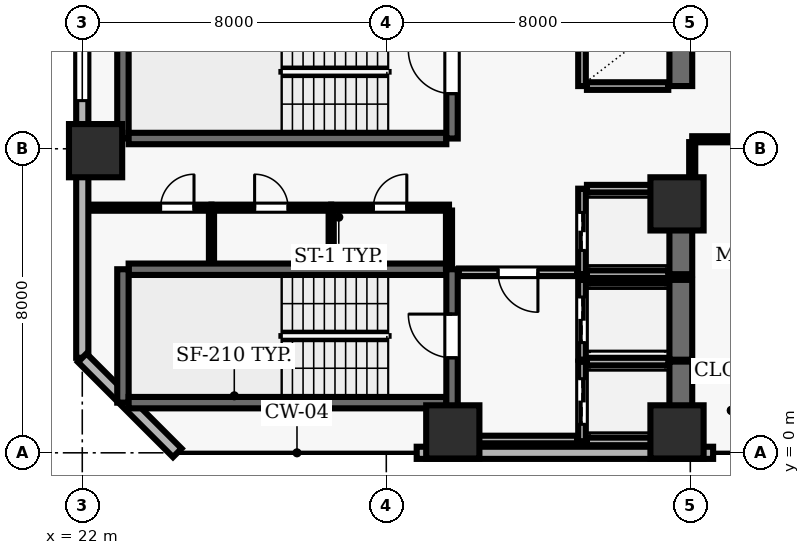
"""IFC4 building model, lengths in metres.
Left out: names, types, materials, properties, quantities, classifications, styles, units other than length and angle.
Written with IfcOpenShell. Run it as: python <this file> out.ifc"""

import sys

from ifc_helpers import new_model, si_unit, direction, frame, frame_2d, origin, origin_2d, place, context, subcontext, project, spatial, rectangle, extrude, element, fill, save


model = new_model("IFC4")
c1 = context("Model", 3, precision=1e-05, world=origin(), true_north=direction((0.0, 1.0)))
c2 = subcontext(c1, "Body", "Model", "MODEL_VIEW")
j1 = project(units=[si_unit("LENGTHUNIT", "METRE"), si_unit("PLANEANGLEUNIT", "RADIAN")], contexts=[c1])
p1 = place(None, origin())
s1 = spatial("IfcSite", under=j1, at=p1, CompositionType="ELEMENT")
p2 = place(p1, origin())
s2 = spatial("IfcBuilding", under=s1, at=p2, CompositionType="ELEMENT")
p3 = place(p2, frame((0.0, 0.0, 38.8)))
s3 = spatial("IfcBuildingStorey", under=s2, at=p3, CompositionType="ELEMENT", Elevation=38.8)
for number, where, z_axis, x_axis in (
    (1, (31.75, 0.55, 0.0), (0.0, 0.0, 1.0), (1.0, 0.0, 0.0)),
    (2, (37.65, 0.55, 0.0), (0.0, 0.0, 1.0), (1.0, 0.0, 0.0)),
    (3, (22.35, 7.95, 0.0), (0.0, 0.0, 1.0), (1.0, 0.0, 0.0)),
    (4, (37.65, 6.55, 0.0), (0.0, 0.0, 1.0), (1.0, 0.0, 0.0)),
):
    element("IfcColumn", number, at=place(p3, frame(where, z_axis=z_axis, x_axis=x_axis)), inside=s3, PredefinedType="COLUMN", context=c2, shape_type="SweptSolid", body=[
        extrude(rectangle(XDim=1.4, YDim=1.4, at=origin_2d()), origin(), (0.0, 0.0, 1.0), 3.9),
    ])
p4 = place(p3, frame((30.8, 0.0, 0.0), z_axis=(0.0, 0.0, 1.0), x_axis=(1.0, 0.0, 0.0)))
e5 = element("IfcWall", 5, at=p4, inside=s3, PredefinedType="SOLIDWALL", context=c2, shape_type="SweptSolid", body=[
    extrude(rectangle(XDim=7.8, YDim=0.32, at=frame_2d((3.9, 0.0))), origin(), (0.0, 0.0, 1.0), 3.69),
])
p5 = place(p3, frame((22.0, 51.5, 0.0), z_axis=(0.0, 0.0, 1.0), x_axis=(0.0, -1.0, 0.0)))
e6 = element("IfcWall", 6, at=p5, inside=s3, PredefinedType="SOLIDWALL", context=c2, shape_type="SweptSolid", body=[
    extrude(rectangle(XDim=49.0, YDim=0.32, at=frame_2d((24.5, 0.0))), origin(), (0.0, 0.0, 1.0), 3.69),
])
p6 = place(p5, frame((12.1, 0.0, 0.0)))
e7 = element("IfcOpeningElement", 7, at=p6, cuts=e6, PredefinedType="OPENING", context=c2, shape_type="SweptSolid", body=[
    extrude(rectangle(XDim=1.0, YDim=2.2, at=frame_2d((0.5, 1.1))), frame((0.0, 0.17, 0.0), z_axis=(0.0, -1.0, 0.0), x_axis=(1.0, 0.0, 0.0)), (0.0, 0.0, 1.0), 0.34),
])
p7 = place(p5, frame((1.322, 0.0, 0.9)))
e8 = element("IfcOpeningElement", 8, at=p7, cuts=e6, PredefinedType="OPENING", context=c2, shape_type="SweptSolid", body=[
    extrude(rectangle(XDim=2.8, YDim=1.8, at=frame_2d((1.4, 0.9))), frame((0.0, 0.17, 0.0), z_axis=(0.0, -1.0, 0.0), x_axis=(1.0, 0.0, 0.0)), (0.0, 0.0, 1.0), 0.34),
])
p8 = place(p5, frame((17.656, 0.0, 0.9)))
e9 = element("IfcOpeningElement", 9, at=p8, cuts=e6, PredefinedType="OPENING", context=c2, shape_type="SweptSolid", body=[
    extrude(rectangle(XDim=2.8, YDim=1.8, at=frame_2d((1.4, 0.9))), frame((0.0, 0.17, 0.0), z_axis=(0.0, -1.0, 0.0), x_axis=(1.0, 0.0, 0.0)), (0.0, 0.0, 1.0), 0.34),
])
p9 = place(p5, frame((28.994, 0.0, 0.9)))
e10 = element("IfcOpeningElement", 10, at=p9, cuts=e6, PredefinedType="OPENING", context=c2, shape_type="SweptSolid", body=[
    extrude(rectangle(XDim=2.8, YDim=1.8, at=frame_2d((1.4, 0.9))), frame((0.0, 0.17, 0.0), z_axis=(0.0, -1.0, 0.0), x_axis=(1.0, 0.0, 0.0)), (0.0, 0.0, 1.0), 0.34),
])
p10 = place(p5, frame((33.089, 0.0, 0.9)))
e11 = element("IfcOpeningElement", 11, at=p10, cuts=e6, PredefinedType="OPENING", context=c2, shape_type="SweptSolid", body=[
    extrude(rectangle(XDim=2.8, YDim=1.8, at=frame_2d((1.4, 0.9))), frame((0.0, 0.17, 0.0), z_axis=(0.0, -1.0, 0.0), x_axis=(1.0, 0.0, 0.0)), (0.0, 0.0, 1.0), 0.34),
])
p11 = place(p5, frame((39.433, 0.0, 0.9)))
e12 = element("IfcOpeningElement", 12, at=p11, cuts=e6, PredefinedType="OPENING", context=c2, shape_type="SweptSolid", body=[
    extrude(rectangle(XDim=2.8, YDim=1.8, at=frame_2d((1.4, 0.9))), frame((0.0, 0.17, 0.0), z_axis=(0.0, -1.0, 0.0), x_axis=(1.0, 0.0, 0.0)), (0.0, 0.0, 1.0), 0.34),
])
p12 = place(p3, frame((22.0, 2.5, 0.0), z_axis=(0.0, 0.0, 1.0), x_axis=(0.707106781187, -0.707106781187, 0.0)))
e13 = element("IfcWall", 13, at=p12, inside=s3, PredefinedType="SOLIDWALL", context=c2, shape_type="SweptSolid", body=[
    extrude(rectangle(XDim=3.536, YDim=0.32, at=frame_2d((1.768, 0.0))), origin(), (0.0, 0.0, 1.0), 3.69),
])
p13 = place(p3, frame((31.58, 4.83, 0.0), z_axis=(0.0, 0.0, 1.0), x_axis=(-1.0, 0.0, 0.0)))
e14 = element("IfcWall", 14, at=p13, inside=s3, PredefinedType="SHEAR", context=c2, shape_type="SweptSolid", body=[
    extrude(rectangle(XDim=8.36, YDim=0.3, at=frame_2d((4.18, 0.0))), origin(), (0.0, 0.0, 1.0), 3.69),
])
p14 = place(p3, frame((23.07, 4.83, 0.0), z_axis=(0.0, 0.0, 1.0), x_axis=(0.0, -1.0, 0.0)))
e15 = element("IfcWall", 15, at=p14, inside=s3, PredefinedType="SHEAR", context=c2, shape_type="SweptSolid", body=[
    extrude(rectangle(XDim=3.51, YDim=0.3, at=frame_2d((1.755, 0.0))), origin(), (0.0, 0.0, 1.0), 3.69),
])
p15 = place(p3, frame((23.22, 1.32, 0.0), z_axis=(0.0, 0.0, 1.0), x_axis=(1.0, 0.0, 0.0)))
e16 = element("IfcWall", 16, at=p15, inside=s3, PredefinedType="SHEAR", context=c2, shape_type="SweptSolid", body=[
    extrude(rectangle(XDim=8.36, YDim=0.3, at=frame_2d((4.18, 0.0))), origin(), (0.0, 0.0, 1.0), 3.69),
])
p16 = place(p3, frame((31.73, 0.96, 0.0), z_axis=(0.0, 0.0, 1.0), x_axis=(0.0, 1.0, 0.0)))
e17 = element("IfcWall", 17, at=p16, inside=s3, PredefinedType="SHEAR", context=c2, shape_type="SweptSolid", body=[
    extrude(rectangle(XDim=3.87, YDim=0.3, at=frame_2d((1.935, 0.0))), origin(), (0.0, 0.0, 1.0), 3.69),
])
p17 = place(p16, frame((1.54, 0.0, 0.0)))
e18 = element("IfcOpeningElement", 18, at=p17, cuts=e17, PredefinedType="OPENING", context=c2, shape_type="SweptSolid", body=[
    extrude(rectangle(XDim=1.15, YDim=2.15, at=frame_2d((0.575, 1.075))), frame((0.0, 0.16, 0.0), z_axis=(0.0, -1.0, 0.0), x_axis=(1.0, 0.0, 0.0)), (0.0, 0.0, 1.0), 0.32),
])
p18 = place(p3, frame((23.07, 11.78, 0.0), z_axis=(0.0, 0.0, 1.0), x_axis=(0.0, -1.0, 0.0)))
e19 = element("IfcWall", 19, at=p18, inside=s3, PredefinedType="SHEAR", context=c2, shape_type="SweptSolid", body=[
    extrude(rectangle(XDim=3.51, YDim=0.3, at=frame_2d((1.755, 0.0))), origin(), (0.0, 0.0, 1.0), 3.69),
])
p19 = place(p3, frame((23.22, 8.27, 0.0), z_axis=(0.0, 0.0, 1.0), x_axis=(1.0, 0.0, 0.0)))
e20 = element("IfcWall", 20, at=p19, inside=s3, PredefinedType="SHEAR", context=c2, shape_type="SweptSolid", body=[
    extrude(rectangle(XDim=8.36, YDim=0.3, at=frame_2d((4.18, 0.0))), origin(), (0.0, 0.0, 1.0), 3.69),
])
p20 = place(p3, frame((31.73, 8.27, 0.0), z_axis=(0.0, 0.0, 1.0), x_axis=(0.0, 1.0, 0.0)))
e21 = element("IfcWall", 21, at=p20, inside=s3, PredefinedType="SHEAR", context=c2, shape_type="SweptSolid", body=[
    extrude(rectangle(XDim=3.51, YDim=0.3, at=frame_2d((1.755, 0.0))), origin(), (0.0, 0.0, 1.0), 3.69),
])
p21 = place(p20, frame((1.18, 0.0, 0.0)))
e22 = element("IfcOpeningElement", 22, at=p21, cuts=e21, PredefinedType="OPENING", context=c2, shape_type="SweptSolid", body=[
    extrude(rectangle(XDim=1.15, YDim=2.15, at=frame_2d((0.575, 1.075))), frame((0.0, 0.16, 0.0), z_axis=(0.0, -1.0, 0.0), x_axis=(1.0, 0.0, 0.0)), (0.0, 0.0, 1.0), 0.32),
])
p22 = place(p3, frame((35.15, 2.4, 0.0), z_axis=(0.0, 0.0, 1.0), x_axis=(0.0, -1.0, 0.0)))
e23 = element("IfcWall", 23, at=p22, inside=s3, PredefinedType="SOLIDWALL", context=c2, shape_type="SweptSolid", body=[
    extrude(rectangle(XDim=2.1, YDim=0.2, at=frame_2d((1.05, 0.0))), origin(), (0.0, 0.0, 1.0), 3.69),
])
p23 = place(p22, frame((0.45, 0.0, 0.0)))
e24 = element("IfcOpeningElement", 24, at=p23, cuts=e23, PredefinedType="OPENING", context=c2, shape_type="SweptSolid", body=[
    extrude(rectangle(XDim=1.2, YDim=2.15, at=frame_2d((0.6, 1.075))), frame((0.0, 0.11, 0.0), z_axis=(0.0, -1.0, 0.0), x_axis=(1.0, 0.0, 0.0)), (0.0, 0.0, 1.0), 0.22),
])
p24 = place(p3, frame((37.75, 0.3, 0.0), z_axis=(0.0, 0.0, 1.0), x_axis=(0.0, 1.0, 0.0)))
e25 = element("IfcWall", 25, at=p24, inside=s3, PredefinedType="SHEAR", context=c2, shape_type="SweptSolid", body=[
    extrude(rectangle(XDim=2.1, YDim=0.6, at=frame_2d((1.05, 0.0))), origin(), (0.0, 0.0, 1.0), 3.69),
])
for number, where, z_axis, x_axis in (
    (26, (35.28, 0.3, 0.0), (0.0, 0.0, 1.0), (1.0, 0.0, 0.0)),
    (27, (37.42, 2.4, 0.0), (0.0, 0.0, 1.0), (-1.0, 0.0, 0.0)),
):
    element("IfcWall", number, at=place(p3, frame(where, z_axis=z_axis, x_axis=x_axis)), inside=s3, PredefinedType="SOLIDWALL", context=c2, shape_type="SweptSolid", body=[
        extrude(rectangle(XDim=2.14, YDim=0.2, at=frame_2d((1.07, 0.0))), origin(), (0.0, 0.0, 1.0), 3.69),
    ])
p25 = place(p3, frame((35.15, 4.55, 0.0), z_axis=(0.0, 0.0, 1.0), x_axis=(0.0, -1.0, 0.0)))
e28 = element("IfcWall", 28, at=p25, inside=s3, PredefinedType="SOLIDWALL", context=c2, shape_type="SweptSolid", body=[
    extrude(rectangle(XDim=2.1, YDim=0.2, at=frame_2d((1.05, 0.0))), origin(), (0.0, 0.0, 1.0), 3.69),
])
p26 = place(p25, frame((0.45, 0.0, 0.0)))
e29 = element("IfcOpeningElement", 29, at=p26, cuts=e28, PredefinedType="OPENING", context=c2, shape_type="SweptSolid", body=[
    extrude(rectangle(XDim=1.2, YDim=2.15, at=frame_2d((0.6, 1.075))), frame((0.0, 0.11, 0.0), z_axis=(0.0, -1.0, 0.0), x_axis=(1.0, 0.0, 0.0)), (0.0, 0.0, 1.0), 0.22),
])
p27 = place(p3, frame((37.75, 2.45, 0.0), z_axis=(0.0, 0.0, 1.0), x_axis=(0.0, 1.0, 0.0)))
e30 = element("IfcWall", 30, at=p27, inside=s3, PredefinedType="SHEAR", context=c2, shape_type="SweptSolid", body=[
    extrude(rectangle(XDim=2.1, YDim=0.6, at=frame_2d((1.05, 0.0))), origin(), (0.0, 0.0, 1.0), 3.69),
])
p28 = place(p3, frame((37.42, 4.55, 0.0), z_axis=(0.0, 0.0, 1.0), x_axis=(-1.0, 0.0, 0.0)))
e31 = element("IfcWall", 31, at=p28, inside=s3, PredefinedType="SOLIDWALL", context=c2, shape_type="SweptSolid", body=[
    extrude(rectangle(XDim=2.14, YDim=0.2, at=frame_2d((1.07, 0.0))), origin(), (0.0, 0.0, 1.0), 3.69),
])
p29 = place(p3, frame((35.15, 6.95, 0.0), z_axis=(0.0, 0.0, 1.0), x_axis=(0.0, -1.0, 0.0)))
e32 = element("IfcWall", 32, at=p29, inside=s3, PredefinedType="SOLIDWALL", context=c2, shape_type="SweptSolid", body=[
    extrude(rectangle(XDim=2.25, YDim=0.2, at=frame_2d((1.125, 0.0))), origin(), (0.0, 0.0, 1.0), 3.69),
])
p30 = place(p29, frame((0.625, 0.0, 0.0)))
e33 = element("IfcOpeningElement", 33, at=p30, cuts=e32, PredefinedType="OPENING", context=c2, shape_type="SweptSolid", body=[
    extrude(rectangle(XDim=1.0, YDim=2.1, at=frame_2d((0.5, 1.05))), frame((0.0, 0.11, 0.0), z_axis=(0.0, -1.0, 0.0), x_axis=(1.0, 0.0, 0.0)), (0.0, 0.0, 1.0), 0.22),
])
p31 = place(p3, frame((37.75, 4.7, 0.0), z_axis=(0.0, 0.0, 1.0), x_axis=(0.0, 1.0, 0.0)))
e34 = element("IfcWall", 34, at=p31, inside=s3, PredefinedType="SHEAR", context=c2, shape_type="SweptSolid", body=[
    extrude(rectangle(XDim=2.25, YDim=0.6, at=frame_2d((1.125, 0.0))), origin(), (0.0, 0.0, 1.0), 3.69),
])
for number, where, z_axis, x_axis in (
    (35, (35.28, 4.7, 0.0), (0.0, 0.0, 1.0), (1.0, 0.0, 0.0)),
    (36, (37.42, 6.95, 0.0), (0.0, 0.0, 1.0), (-1.0, 0.0, 0.0)),
):
    element("IfcWall", number, at=place(p3, frame(where, z_axis=z_axis, x_axis=x_axis)), inside=s3, PredefinedType="SOLIDWALL", context=c2, shape_type="SweptSolid", body=[
        extrude(rectangle(XDim=2.14, YDim=0.2, at=frame_2d((1.07, 0.0))), origin(), (0.0, 0.0, 1.0), 3.69),
    ])
p32 = place(p3, frame((35.15, 11.55, 0.0), z_axis=(0.0, 0.0, 1.0), x_axis=(0.0, -1.0, 0.0)))
e37 = element("IfcWall", 37, at=p32, inside=s3, PredefinedType="SOLIDWALL", context=c2, shape_type="SweptSolid", body=[
    extrude(rectangle(XDim=1.9, YDim=0.2, at=frame_2d((0.95, 0.0))), origin(), (0.0, 0.0, 1.0), 3.69),
])
p33 = place(p3, frame((37.75, 9.65, 0.0), z_axis=(0.0, 0.0, 1.0), x_axis=(0.0, 1.0, 0.0)))
e38 = element("IfcWall", 38, at=p33, inside=s3, PredefinedType="SHEAR", context=c2, shape_type="SweptSolid", body=[
    extrude(rectangle(XDim=1.9, YDim=0.6, at=frame_2d((0.95, 0.0))), origin(), (0.0, 0.0, 1.0), 3.69),
])
p34 = place(p3, frame((35.28, 9.65, 0.0), z_axis=(0.0, 0.0, 1.0), x_axis=(1.0, 0.0, 0.0)))
e39 = element("IfcWall", 39, at=p34, inside=s3, PredefinedType="SOLIDWALL", context=c2, shape_type="SweptSolid", body=[
    extrude(rectangle(XDim=2.14, YDim=0.2, at=frame_2d((1.07, 0.0))), origin(), (0.0, 0.0, 1.0), 3.69),
])
p35 = place(p3, frame((22.2, 6.45, 0.0), z_axis=(0.0, 0.0, 1.0), x_axis=(1.0, 0.0, 0.0)))
e40 = element("IfcWall", 40, at=p35, inside=s3, PredefinedType="PARTITIONING", context=c2, shape_type="SweptSolid", body=[
    extrude(rectangle(XDim=3.2, YDim=0.16, at=frame_2d((1.6, 0.0))), origin(), (0.0, 0.0, 1.0), 3.69),
])
p36 = place(p35, frame((1.86, 0.0, 0.0)))
e41 = element("IfcOpeningElement", 41, at=p36, cuts=e40, PredefinedType="OPENING", context=c2, shape_type="SweptSolid", body=[
    extrude(rectangle(XDim=0.88, YDim=2.1, at=frame_2d((0.44, 1.05))), frame((0.0, 0.09, 0.0), z_axis=(0.0, -1.0, 0.0), x_axis=(1.0, 0.0, 0.0)), (0.0, 0.0, 1.0), 0.18),
])
p37 = place(p3, frame((25.4, 6.45, 0.0), z_axis=(0.0, 0.0, 1.0), x_axis=(1.0, 0.0, 0.0)))
e42 = element("IfcWall", 42, at=p37, inside=s3, PredefinedType="PARTITIONING", context=c2, shape_type="SweptSolid", body=[
    extrude(rectangle(XDim=3.15, YDim=0.16, at=frame_2d((1.575, 0.0))), origin(), (0.0, 0.0, 1.0), 3.69),
])
p38 = place(p37, frame((1.135, 0.0, 0.0)))
e43 = element("IfcOpeningElement", 43, at=p38, cuts=e42, PredefinedType="OPENING", context=c2, shape_type="SweptSolid", body=[
    extrude(rectangle(XDim=0.88, YDim=2.1, at=frame_2d((0.44, 1.05))), frame((0.0, 0.09, 0.0), z_axis=(0.0, -1.0, 0.0), x_axis=(1.0, 0.0, 0.0)), (0.0, 0.0, 1.0), 0.18),
])
p39 = place(p3, frame((28.55, 6.45, 0.0), z_axis=(0.0, 0.0, 1.0), x_axis=(1.0, 0.0, 0.0)))
e44 = element("IfcWall", 44, at=p39, inside=s3, PredefinedType="PARTITIONING", context=c2, shape_type="SweptSolid", body=[
    extrude(rectangle(XDim=3.1, YDim=0.16, at=frame_2d((1.55, 0.0))), origin(), (0.0, 0.0, 1.0), 3.69),
])
p40 = place(p39, frame((1.11, 0.0, 0.0)))
e45 = element("IfcOpeningElement", 45, at=p40, cuts=e44, PredefinedType="OPENING", context=c2, shape_type="SweptSolid", body=[
    extrude(rectangle(XDim=0.88, YDim=2.1, at=frame_2d((0.44, 1.05))), frame((0.0, 0.09, 0.0), z_axis=(0.0, -1.0, 0.0), x_axis=(1.0, 0.0, 0.0)), (0.0, 0.0, 1.0), 0.18),
])
p41 = place(p3, frame((31.65, 0.35, 0.0), z_axis=(0.0, 0.0, 1.0), x_axis=(1.0, 0.0, 0.0)))
e46 = element("IfcWall", 46, at=p41, inside=s3, PredefinedType="SOLIDWALL", context=c2, shape_type="SweptSolid", body=[
    extrude(rectangle(XDim=3.37, YDim=0.2, at=frame_2d((1.685, 0.0))), origin(), (0.0, 0.0, 1.0), 3.69),
])
p42 = place(p3, frame((35.02, 4.75, 0.0), z_axis=(0.0, 0.0, 1.0), x_axis=(-1.0, 0.0, 0.0)))
e47 = element("IfcWall", 47, at=p42, inside=s3, PredefinedType="SOLIDWALL", context=c2, shape_type="SweptSolid", body=[
    extrude(rectangle(XDim=3.11, YDim=0.2, at=frame_2d((1.555, 0.0))), origin(), (0.0, 0.0, 1.0), 3.69),
])
p43 = place(p42, frame((1.03, 0.0, 0.0)))
e48 = element("IfcOpeningElement", 48, at=p43, cuts=e47, PredefinedType="OPENING", context=c2, shape_type="SweptSolid", body=[
    extrude(rectangle(XDim=1.05, YDim=2.15, at=frame_2d((0.525, 1.075))), frame((0.0, 0.11, 0.0), z_axis=(0.0, -1.0, 0.0), x_axis=(1.0, 0.0, 0.0)), (0.0, 0.0, 1.0), 0.22),
])
p44 = place(p3, frame((38.05, 8.25, 0.0), z_axis=(0.0, 0.0, 1.0), x_axis=(1.0, 0.0, 0.0)))
e49 = element("IfcWall", 49, at=p44, inside=s3, PredefinedType="PARTITIONING", context=c2, shape_type="SweptSolid", body=[
    extrude(rectangle(XDim=2.3, YDim=0.16, at=frame_2d((1.15, 0.0))), origin(), (0.0, 0.0, 1.0), 2.995),
])
p45 = place(p44, frame((1.0, 0.0, 0.0)))
e50 = element("IfcOpeningElement", 50, at=p45, cuts=e49, PredefinedType="OPENING", context=c2, shape_type="SweptSolid", body=[
    extrude(rectangle(XDim=1.0, YDim=2.1, at=frame_2d((0.5, 1.05))), frame((0.0, 0.09, 0.0), z_axis=(0.0, -1.0, 0.0), x_axis=(1.0, 0.0, 0.0)), (0.0, 0.0, 1.0), 0.18),
])
for number, where, z_axis, x_axis in (
    (51, (25.4, 5.01, 0.0), (0.0, 0.0, 1.0), (0.0, 1.0, 0.0)),
    (52, (28.55, 5.01, 0.0), (0.0, 0.0, 1.0), (0.0, 1.0, 0.0)),
):
    element("IfcWall", number, at=place(p3, frame(where, z_axis=z_axis, x_axis=x_axis)), inside=s3, PredefinedType="PARTITIONING", context=c2, shape_type="SweptSolid", body=[
        extrude(rectangle(XDim=1.365, YDim=0.135, at=frame_2d((0.683, 0.0))), origin(), (0.0, 0.0, 1.0), 3.69),
    ])
p46 = place(p3, frame((31.65, 4.86, 0.0), z_axis=(0.0, 0.0, 1.0), x_axis=(0.0, 1.0, 0.0)))
e53 = element("IfcWall", 53, at=p46, inside=s3, PredefinedType="PARTITIONING", context=c2, shape_type="SweptSolid", body=[
    extrude(rectangle(XDim=1.515, YDim=0.16, at=frame_2d((0.757, 0.0))), origin(), (0.0, 0.0, 1.0), 3.69),
])
p47 = place(p3, frame((38.05, 7.05, 0.0), z_axis=(0.0, 0.0, 1.0), x_axis=(0.0, 1.0, 0.0)))
e54 = element("IfcWall", 54, at=p47, inside=s3, PredefinedType="PARTITIONING", context=c2, shape_type="SweptSolid", body=[
    extrude(rectangle(XDim=1.125, YDim=0.16, at=frame_2d((0.562, 0.0))), origin(), (0.0, 0.0, 1.0), 2.995),
])
p48 = place(p11, origin())
e55 = element("IfcWindow", 55, at=p48, inside=s3, PartitioningType="SINGLE_PANEL", PredefinedType="WINDOW", context=c2, shape_type="SweptSolid", body=[
    extrude(rectangle(XDim=2.8, YDim=1.8, at=frame_2d((1.4, 0.9))), frame((0.0, 0.03, 0.0), z_axis=(0.0, -1.0, 0.0), x_axis=(1.0, 0.0, 0.0)), (0.0, 0.0, 1.0), 0.06),
])
fill(e12, e55)
p49 = place(p17, origin())
e56 = element("IfcDoor", 56, at=p49, inside=s3, OperationType="SINGLE_SWING_RIGHT", PredefinedType="DOOR", context=c2, shape_type="SweptSolid", body=[
    extrude(rectangle(XDim=1.15, YDim=2.15, at=frame_2d((0.575, 1.075))), frame((0.0, 0.025, 0.0), z_axis=(0.0, -1.0, 0.0), x_axis=(1.0, 0.0, 0.0)), (0.0, 0.0, 1.0), 0.05),
])
fill(e18, e56)
p50 = place(p21, origin())
e57 = element("IfcDoor", 57, at=p50, inside=s3, OperationType="SINGLE_SWING_RIGHT", PredefinedType="DOOR", context=c2, shape_type="SweptSolid", body=[
    extrude(rectangle(XDim=1.15, YDim=2.15, at=frame_2d((0.575, 1.075))), frame((0.0, 0.025, 0.0), z_axis=(0.0, -1.0, 0.0), x_axis=(1.0, 0.0, 0.0)), (0.0, 0.0, 1.0), 0.05),
])
fill(e22, e57)
p51 = place(p23, origin())
e58 = element("IfcDoor", 58, at=p51, inside=s3, OperationType="DOUBLE_DOOR_SLIDING", PredefinedType="DOOR", context=c2, shape_type="SweptSolid", body=[
    extrude(rectangle(XDim=1.2, YDim=2.15, at=frame_2d((0.6, 1.075))), frame((0.0, 0.025, 0.0), z_axis=(0.0, -1.0, 0.0), x_axis=(1.0, 0.0, 0.0)), (0.0, 0.0, 1.0), 0.05),
])
fill(e24, e58)
p52 = place(p26, origin())
e59 = element("IfcDoor", 59, at=p52, inside=s3, OperationType="DOUBLE_DOOR_SLIDING", PredefinedType="DOOR", context=c2, shape_type="SweptSolid", body=[
    extrude(rectangle(XDim=1.2, YDim=2.15, at=frame_2d((0.6, 1.075))), frame((0.0, 0.025, 0.0), z_axis=(0.0, -1.0, 0.0), x_axis=(1.0, 0.0, 0.0)), (0.0, 0.0, 1.0), 0.05),
])
fill(e29, e59)
p53 = place(p30, origin())
e60 = element("IfcDoor", 60, at=p53, inside=s3, OperationType="DOUBLE_DOOR_SLIDING", PredefinedType="DOOR", context=c2, shape_type="SweptSolid", body=[
    extrude(rectangle(XDim=1.0, YDim=2.1, at=frame_2d((0.5, 1.05))), frame((0.0, 0.025, 0.0), z_axis=(0.0, -1.0, 0.0), x_axis=(1.0, 0.0, 0.0)), (0.0, 0.0, 1.0), 0.05),
])
fill(e33, e60)
p54 = place(p43, origin())
e61 = element("IfcDoor", 61, at=p54, inside=s3, OperationType="SINGLE_SWING_LEFT", PredefinedType="DOOR", context=c2, shape_type="SweptSolid", body=[
    extrude(rectangle(XDim=1.05, YDim=2.15, at=frame_2d((0.525, 1.075))), frame((0.0, 0.025, 0.0), z_axis=(0.0, -1.0, 0.0), x_axis=(1.0, 0.0, 0.0)), (0.0, 0.0, 1.0), 0.05),
])
fill(e48, e61)
p55 = place(p36, origin())
e62 = element("IfcDoor", 62, at=p55, inside=s3, OperationType="SINGLE_SWING_RIGHT", PredefinedType="DOOR", context=c2, shape_type="SweptSolid", body=[
    extrude(rectangle(XDim=0.88, YDim=2.1, at=frame_2d((0.44, 1.05))), frame((0.0, 0.025, 0.0), z_axis=(0.0, -1.0, 0.0), x_axis=(1.0, 0.0, 0.0)), (0.0, 0.0, 1.0), 0.05),
])
fill(e41, e62)
p56 = place(p38, origin())
e63 = element("IfcDoor", 63, at=p56, inside=s3, OperationType="SINGLE_SWING_LEFT", PredefinedType="DOOR", context=c2, shape_type="SweptSolid", body=[
    extrude(rectangle(XDim=0.88, YDim=2.1, at=frame_2d((0.44, 1.05))), frame((0.0, 0.025, 0.0), z_axis=(0.0, -1.0, 0.0), x_axis=(1.0, 0.0, 0.0)), (0.0, 0.0, 1.0), 0.05),
])
fill(e43, e63)
p57 = place(p40, origin())
e64 = element("IfcDoor", 64, at=p57, inside=s3, OperationType="SINGLE_SWING_RIGHT", PredefinedType="DOOR", context=c2, shape_type="SweptSolid", body=[
    extrude(rectangle(XDim=0.88, YDim=2.1, at=frame_2d((0.44, 1.05))), frame((0.0, 0.025, 0.0), z_axis=(0.0, -1.0, 0.0), x_axis=(1.0, 0.0, 0.0)), (0.0, 0.0, 1.0), 0.05),
])
fill(e45, e64)
save(model, sys.argv[1])
